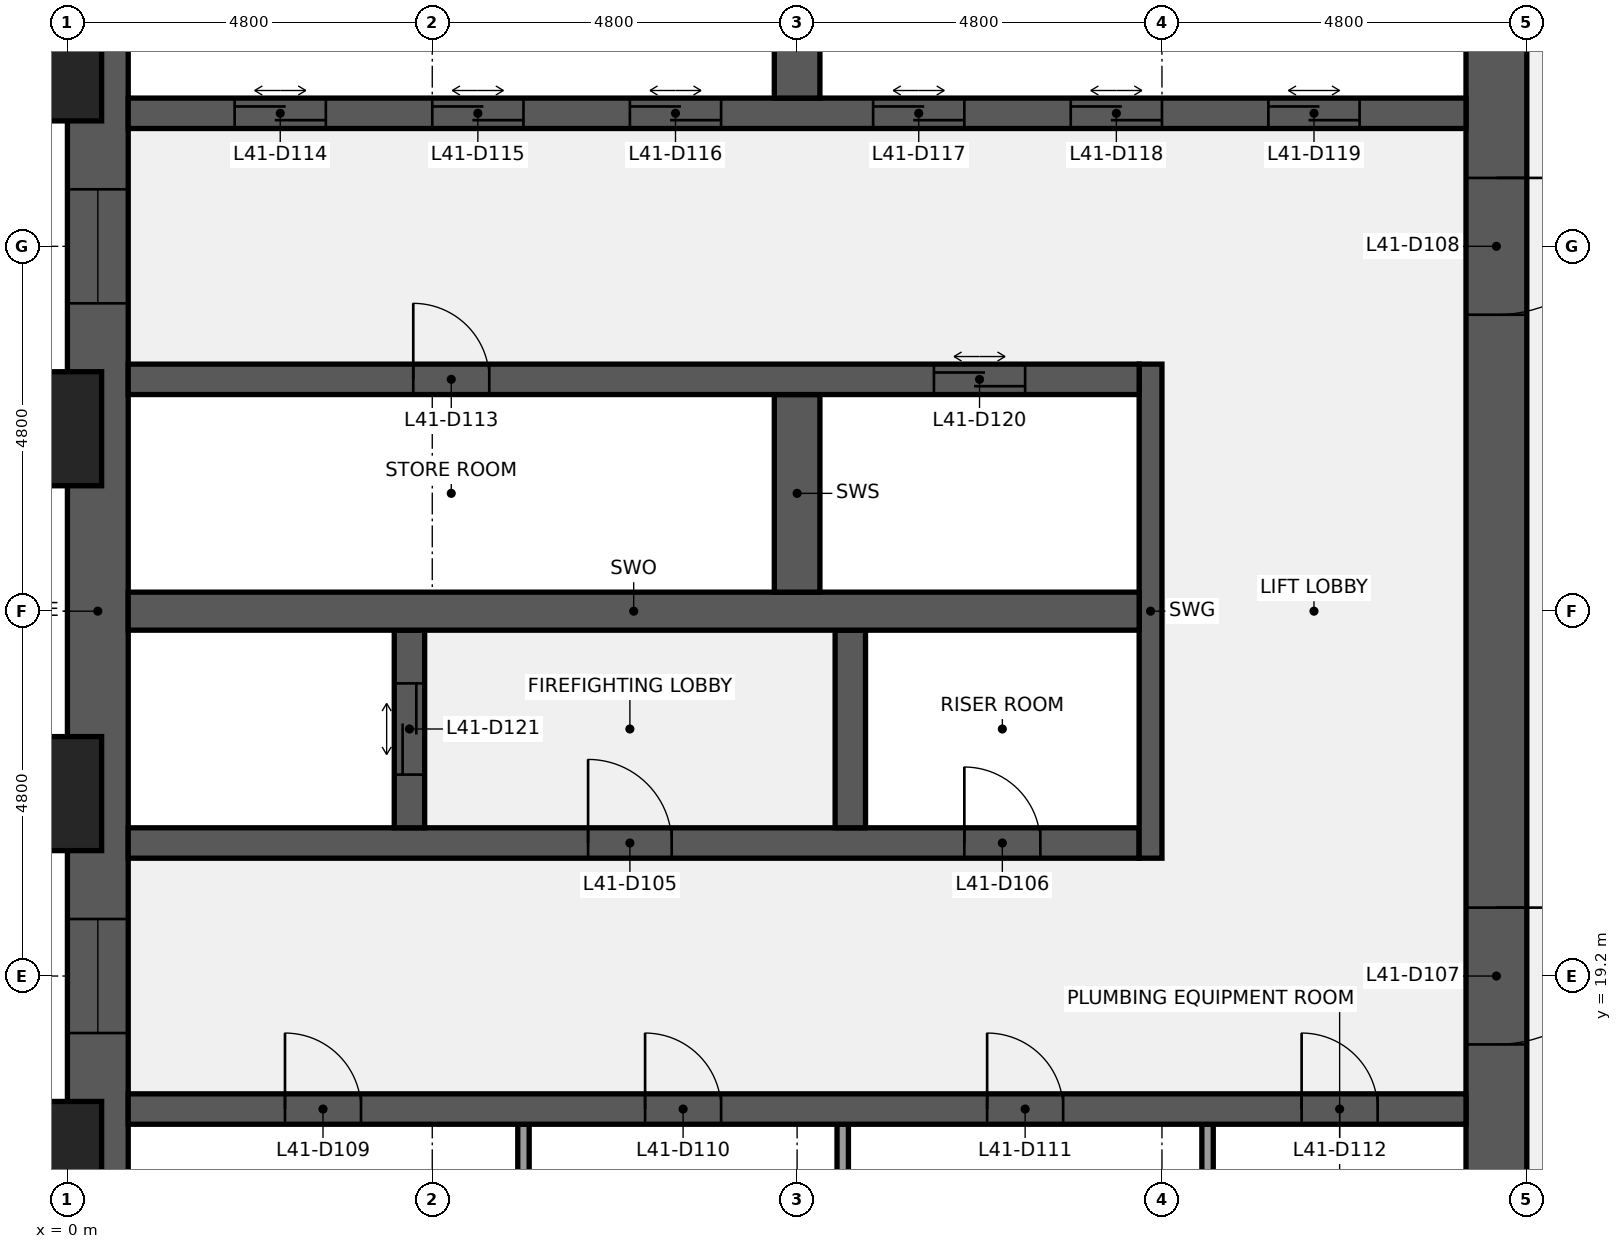
"""IFC4 building model, lengths in metres.
Left out: names, types, materials, properties, quantities, classifications, styles, units other than length and angle.
Written with IfcOpenShell. Run it as: python <this file> out.ifc"""

import sys

from ifc_helpers import new_model, si_unit, direction, frame, frame_2d, origin, origin_2d, place, context, subcontext, project, spatial, rectangle, extrude, element, fill, save


model = new_model("IFC4")
c1 = context("Model", 3, precision=1e-05, world=origin(), true_north=direction((0.0, 1.0)))
c2 = subcontext(c1, "Body", "Model", "MODEL_VIEW")
j1 = project(units=[si_unit("LENGTHUNIT", "METRE"), si_unit("PLANEANGLEUNIT", "RADIAN")], contexts=[c1])
p1 = place(None, origin())
s1 = spatial("IfcSite", under=j1, at=p1, CompositionType="ELEMENT")
p2 = place(p1, origin())
s2 = spatial("IfcBuilding", under=s1, at=p2, CompositionType="ELEMENT")
p3 = place(p2, frame((0.0, 0.0, 193.2)))
s3 = spatial("IfcBuildingStorey", under=s2, at=p3, CompositionType="ELEMENT", Elevation=193.2)
p4 = place(p3, frame((0.4, 9.6, 0.0), z_axis=(0.0, 0.0, 1.0), x_axis=(0.0, 1.0, 0.0)))
e1 = element("IfcWall", 1, at=p4, inside=s3, PredefinedType="SHEAR", context=c2, shape_type="SweptSolid", body=[
    extrude(rectangle(XDim=28.8, YDim=0.8, at=frame_2d((14.4, 0.0))), origin(), (0.0, 0.0, 1.0), 3.84),
])
p5 = place(p4, frame((8.85, 0.0, 0.9)))
e2 = element("IfcOpeningElement", 2, at=p5, cuts=e1, PredefinedType="OPENING", context=c2, shape_type="SweptSolid", body=[
    extrude(rectangle(XDim=1.5, YDim=1.5, at=frame_2d((0.75, 0.75))), frame((0.0, 0.41, 0.0), z_axis=(0.0, -1.0, 0.0), x_axis=(1.0, 0.0, 0.0)), (0.0, 0.0, 1.0), 0.82),
])
p6 = place(p4, frame((18.45, 0.0, 0.9)))
e3 = element("IfcOpeningElement", 3, at=p6, cuts=e1, PredefinedType="OPENING", context=c2, shape_type="SweptSolid", body=[
    extrude(rectangle(XDim=1.5, YDim=1.5, at=frame_2d((0.75, 0.75))), frame((0.0, 0.41, 0.0), z_axis=(0.0, -1.0, 0.0), x_axis=(1.0, 0.0, 0.0)), (0.0, 0.0, 1.0), 0.82),
])
p7 = place(p3, frame((18.8, 38.4, 0.0), z_axis=(0.0, 0.0, 1.0), x_axis=(0.0, -1.0, 0.0)))
e4 = element("IfcWall", 4, at=p7, inside=s3, PredefinedType="SHEAR", context=c2, shape_type="SweptSolid", body=[
    extrude(rectangle(XDim=28.8, YDim=0.8, at=frame_2d((14.4, 0.0))), origin(), (0.0, 0.0, 1.0), 3.84),
])
p8 = place(p7, frame((18.3, 0.0, 0.0)))
e5 = element("IfcOpeningElement", 5, at=p8, cuts=e4, PredefinedType="OPENING", context=c2, shape_type="SweptSolid", body=[
    extrude(rectangle(XDim=1.8, YDim=2.1, at=frame_2d((0.9, 1.05))), frame((0.0, 0.41, 0.0), z_axis=(0.0, -1.0, 0.0), x_axis=(1.0, 0.0, 0.0)), (0.0, 0.0, 1.0), 0.82),
])
p9 = place(p7, frame((8.7, 0.0, 0.0)))
e6 = element("IfcOpeningElement", 6, at=p9, cuts=e4, PredefinedType="OPENING", context=c2, shape_type="SweptSolid", body=[
    extrude(rectangle(XDim=1.8, YDim=2.1, at=frame_2d((0.9, 1.05))), frame((0.0, 0.41, 0.0), z_axis=(0.0, -1.0, 0.0), x_axis=(1.0, 0.0, 0.0)), (0.0, 0.0, 1.0), 0.82),
])
for number, where, z_axis, x_axis in (
    (7, (6.0, 14.65, 0.0), (0.0, 0.0, 1.0), (0.0, 1.0, 0.0)),
    (8, (10.2, 14.65, 0.0), (0.0, 0.0, 1.0), (0.0, 1.0, 0.0)),
    (9, (15.0, 14.65, 0.0), (0.0, 0.0, 1.0), (0.0, 1.0, 0.0)),
):
    element("IfcWall", number, at=place(p3, frame(where, z_axis=z_axis, x_axis=x_axis)), inside=s3, PredefinedType="PARTITIONING", context=c2, shape_type="SweptSolid", body=[
        extrude(rectangle(XDim=2.6, YDim=0.15, at=frame_2d((1.3, 0.0))), origin(), (0.0, 0.0, 1.0), 3.84),
    ])
p10 = place(p3, frame((0.8, 17.45, 0.0), z_axis=(0.0, 0.0, 1.0), x_axis=(1.0, 0.0, 0.0)))
e10 = element("IfcWall", 10, at=p10, inside=s3, PredefinedType="SHEAR", context=c2, shape_type="SweptSolid", body=[
    extrude(rectangle(XDim=17.6, YDim=0.4, at=frame_2d((8.8, 0.0))), origin(), (0.0, 0.0, 1.0), 3.84),
])
p11 = place(p10, frame((2.062, 0.0, 0.0)))
e11 = element("IfcOpeningElement", 11, at=p11, cuts=e10, PredefinedType="OPENING", context=c2, shape_type="SweptSolid", body=[
    extrude(rectangle(XDim=1.0, YDim=2.1, at=frame_2d((0.5, 1.05))), frame((0.0, 0.21, 0.0), z_axis=(0.0, -1.0, 0.0), x_axis=(1.0, 0.0, 0.0)), (0.0, 0.0, 1.0), 0.42),
])
p12 = place(p10, frame((6.8, 0.0, 0.0)))
e12 = element("IfcOpeningElement", 12, at=p12, cuts=e10, PredefinedType="OPENING", context=c2, shape_type="SweptSolid", body=[
    extrude(rectangle(XDim=1.0, YDim=2.1, at=frame_2d((0.5, 1.05))), frame((0.0, 0.21, 0.0), z_axis=(0.0, -1.0, 0.0), x_axis=(1.0, 0.0, 0.0)), (0.0, 0.0, 1.0), 0.42),
])
p13 = place(p10, frame((11.3, 0.0, 0.0)))
e13 = element("IfcOpeningElement", 13, at=p13, cuts=e10, PredefinedType="OPENING", context=c2, shape_type="SweptSolid", body=[
    extrude(rectangle(XDim=1.0, YDim=2.1, at=frame_2d((0.5, 1.05))), frame((0.0, 0.21, 0.0), z_axis=(0.0, -1.0, 0.0), x_axis=(1.0, 0.0, 0.0)), (0.0, 0.0, 1.0), 0.42),
])
p14 = place(p10, frame((15.438, 0.0, 0.0)))
e14 = element("IfcOpeningElement", 14, at=p14, cuts=e10, PredefinedType="OPENING", context=c2, shape_type="SweptSolid", body=[
    extrude(rectangle(XDim=1.0, YDim=2.1, at=frame_2d((0.5, 1.05))), frame((0.0, 0.21, 0.0), z_axis=(0.0, -1.0, 0.0), x_axis=(1.0, 0.0, 0.0)), (0.0, 0.0, 1.0), 0.42),
])
p15 = place(p3, frame((0.8, 20.95, 0.0), z_axis=(0.0, 0.0, 1.0), x_axis=(1.0, 0.0, 0.0)))
e15 = element("IfcWall", 15, at=p15, inside=s3, PredefinedType="SHEAR", context=c2, shape_type="SweptSolid", body=[
    extrude(rectangle(XDim=13.3, YDim=0.4, at=frame_2d((6.65, 0.0))), origin(), (0.0, 0.0, 1.0), 3.84),
])
p16 = place(p15, frame((6.05, 0.0, 0.0)))
e16 = element("IfcOpeningElement", 16, at=p16, cuts=e15, PredefinedType="OPENING", context=c2, shape_type="SweptSolid", body=[
    extrude(rectangle(XDim=1.1, YDim=2.1, at=frame_2d((0.55, 1.05))), frame((0.0, 0.21, 0.0), z_axis=(0.0, -1.0, 0.0), x_axis=(1.0, 0.0, 0.0)), (0.0, 0.0, 1.0), 0.42),
])
p17 = place(p15, frame((11.0, 0.0, 0.0)))
e17 = element("IfcOpeningElement", 17, at=p17, cuts=e15, PredefinedType="OPENING", context=c2, shape_type="SweptSolid", body=[
    extrude(rectangle(XDim=1.0, YDim=2.1, at=frame_2d((0.5, 1.05))), frame((0.0, 0.21, 0.0), z_axis=(0.0, -1.0, 0.0), x_axis=(1.0, 0.0, 0.0)), (0.0, 0.0, 1.0), 0.42),
])
p18 = place(p3, frame((14.25, 20.75, 0.0), z_axis=(0.0, 0.0, 1.0), x_axis=(0.0, 1.0, 0.0)))
e18 = element("IfcWall", 18, at=p18, inside=s3, PredefinedType="SHEAR", context=c2, shape_type="SweptSolid", body=[
    extrude(rectangle(XDim=6.5, YDim=0.3, at=frame_2d((3.25, 0.0))), origin(), (0.0, 0.0, 1.0), 3.84),
])
p19 = place(p3, frame((4.5, 21.15, 0.0), z_axis=(0.0, 0.0, 1.0), x_axis=(0.0, 1.0, 0.0)))
e19 = element("IfcWall", 19, at=p19, inside=s3, PredefinedType="SHEAR", context=c2, shape_type="SweptSolid", body=[
    extrude(rectangle(XDim=2.6, YDim=0.4, at=frame_2d((1.3, 0.0))), origin(), (0.0, 0.0, 1.0), 3.84),
])
p20 = place(p19, frame((0.7, 0.0, 0.0)))
e20 = element("IfcOpeningElement", 20, at=p20, cuts=e19, PredefinedType="OPENING", context=c2, shape_type="SweptSolid", body=[
    extrude(rectangle(XDim=1.2, YDim=2.1, at=frame_2d((0.6, 1.05))), frame((0.0, 0.21, 0.0), z_axis=(0.0, -1.0, 0.0), x_axis=(1.0, 0.0, 0.0)), (0.0, 0.0, 1.0), 0.42),
])
p21 = place(p3, frame((10.3, 21.15, 0.0), z_axis=(0.0, 0.0, 1.0), x_axis=(0.0, 1.0, 0.0)))
e21 = element("IfcWall", 21, at=p21, inside=s3, PredefinedType="SHEAR", context=c2, shape_type="SweptSolid", body=[
    extrude(rectangle(XDim=2.6, YDim=0.4, at=frame_2d((1.3, 0.0))), origin(), (0.0, 0.0, 1.0), 3.84),
])
p22 = place(p3, frame((0.8, 24.0, 0.0), z_axis=(0.0, 0.0, 1.0), x_axis=(1.0, 0.0, 0.0)))
e22 = element("IfcWall", 22, at=p22, inside=s3, PredefinedType="SHEAR", context=c2, shape_type="SweptSolid", body=[
    extrude(rectangle(XDim=13.3, YDim=0.5, at=frame_2d((6.65, 0.0))), origin(), (0.0, 0.0, 1.0), 3.84),
])
p23 = place(p3, frame((9.6, 24.25, 0.0), z_axis=(0.0, 0.0, 1.0), x_axis=(0.0, 1.0, 0.0)))
e23 = element("IfcWall", 23, at=p23, inside=s3, PredefinedType="SHEAR", context=c2, shape_type="SweptSolid", body=[
    extrude(rectangle(XDim=2.6, YDim=0.6, at=frame_2d((1.3, 0.0))), origin(), (0.0, 0.0, 1.0), 3.84),
])
p24 = place(p3, frame((0.8, 27.05, 0.0), z_axis=(0.0, 0.0, 1.0), x_axis=(1.0, 0.0, 0.0)))
e24 = element("IfcWall", 24, at=p24, inside=s3, PredefinedType="SHEAR", context=c2, shape_type="SweptSolid", body=[
    extrude(rectangle(XDim=13.3, YDim=0.4, at=frame_2d((6.65, 0.0))), origin(), (0.0, 0.0, 1.0), 3.84),
])
p25 = place(p24, frame((3.75, 0.0, 0.0)))
e25 = element("IfcOpeningElement", 25, at=p25, cuts=e24, PredefinedType="OPENING", context=c2, shape_type="SweptSolid", body=[
    extrude(rectangle(XDim=1.0, YDim=2.1, at=frame_2d((0.5, 1.05))), frame((0.0, 0.21, 0.0), z_axis=(0.0, -1.0, 0.0), x_axis=(1.0, 0.0, 0.0)), (0.0, 0.0, 1.0), 0.42),
])
p26 = place(p24, frame((10.6, 0.0, 0.0)))
e26 = element("IfcOpeningElement", 26, at=p26, cuts=e24, PredefinedType="OPENING", context=c2, shape_type="SweptSolid", body=[
    extrude(rectangle(XDim=1.2, YDim=2.1, at=frame_2d((0.6, 1.05))), frame((0.0, 0.21, 0.0), z_axis=(0.0, -1.0, 0.0), x_axis=(1.0, 0.0, 0.0)), (0.0, 0.0, 1.0), 0.42),
])
p27 = place(p3, frame((0.8, 30.55, 0.0), z_axis=(0.0, 0.0, 1.0), x_axis=(1.0, 0.0, 0.0)))
e27 = element("IfcWall", 27, at=p27, inside=s3, PredefinedType="SHEAR", context=c2, shape_type="SweptSolid", body=[
    extrude(rectangle(XDim=17.6, YDim=0.4, at=frame_2d((8.8, 0.0))), origin(), (0.0, 0.0, 1.0), 3.84),
])
p28 = place(p27, frame((1.4, 0.0, 0.0)))
e28 = element("IfcOpeningElement", 28, at=p28, cuts=e27, PredefinedType="OPENING", context=c2, shape_type="SweptSolid", body=[
    extrude(rectangle(XDim=1.2, YDim=2.1, at=frame_2d((0.6, 1.05))), frame((0.0, 0.21, 0.0), z_axis=(0.0, -1.0, 0.0), x_axis=(1.0, 0.0, 0.0)), (0.0, 0.0, 1.0), 0.42),
])
p29 = place(p27, frame((4.0, 0.0, 0.0)))
e29 = element("IfcOpeningElement", 29, at=p29, cuts=e27, PredefinedType="OPENING", context=c2, shape_type="SweptSolid", body=[
    extrude(rectangle(XDim=1.2, YDim=2.1, at=frame_2d((0.6, 1.05))), frame((0.0, 0.21, 0.0), z_axis=(0.0, -1.0, 0.0), x_axis=(1.0, 0.0, 0.0)), (0.0, 0.0, 1.0), 0.42),
])
p30 = place(p27, frame((6.6, 0.0, 0.0)))
e30 = element("IfcOpeningElement", 30, at=p30, cuts=e27, PredefinedType="OPENING", context=c2, shape_type="SweptSolid", body=[
    extrude(rectangle(XDim=1.2, YDim=2.1, at=frame_2d((0.6, 1.05))), frame((0.0, 0.21, 0.0), z_axis=(0.0, -1.0, 0.0), x_axis=(1.0, 0.0, 0.0)), (0.0, 0.0, 1.0), 0.42),
])
p31 = place(p27, frame((9.8, 0.0, 0.0)))
e31 = element("IfcOpeningElement", 31, at=p31, cuts=e27, PredefinedType="OPENING", context=c2, shape_type="SweptSolid", body=[
    extrude(rectangle(XDim=1.2, YDim=2.1, at=frame_2d((0.6, 1.05))), frame((0.0, 0.21, 0.0), z_axis=(0.0, -1.0, 0.0), x_axis=(1.0, 0.0, 0.0)), (0.0, 0.0, 1.0), 0.42),
])
p32 = place(p27, frame((12.4, 0.0, 0.0)))
e32 = element("IfcOpeningElement", 32, at=p32, cuts=e27, PredefinedType="OPENING", context=c2, shape_type="SweptSolid", body=[
    extrude(rectangle(XDim=1.2, YDim=2.1, at=frame_2d((0.6, 1.05))), frame((0.0, 0.21, 0.0), z_axis=(0.0, -1.0, 0.0), x_axis=(1.0, 0.0, 0.0)), (0.0, 0.0, 1.0), 0.42),
])
p33 = place(p27, frame((15.0, 0.0, 0.0)))
e33 = element("IfcOpeningElement", 33, at=p33, cuts=e27, PredefinedType="OPENING", context=c2, shape_type="SweptSolid", body=[
    extrude(rectangle(XDim=1.2, YDim=2.1, at=frame_2d((0.6, 1.05))), frame((0.0, 0.21, 0.0), z_axis=(0.0, -1.0, 0.0), x_axis=(1.0, 0.0, 0.0)), (0.0, 0.0, 1.0), 0.42),
])
p34 = place(p3, frame((9.6, 30.75, 0.0), z_axis=(0.0, 0.0, 1.0), x_axis=(0.0, 1.0, 0.0)))
e34 = element("IfcWall", 34, at=p34, inside=s3, PredefinedType="SHEAR", context=c2, shape_type="SweptSolid", body=[
    extrude(rectangle(XDim=2.6, YDim=0.6, at=frame_2d((1.3, 0.0))), origin(), (0.0, 0.0, 1.0), 3.84),
])
for number, where, z_axis, x_axis in (
    (35, (-0.75, 16.8, 0.0), (0.0, 0.0, 1.0), (0.0, 1.0, 0.0)),
    (36, (-0.75, 21.6, 0.0), (0.0, 0.0, 1.0), (0.0, 1.0, 0.0)),
    (37, (-0.75, 26.4, 0.0), (0.0, 0.0, 1.0), (0.0, 1.0, 0.0)),
    (38, (-0.75, 31.2, 0.0), (0.0, 0.0, 1.0), (0.0, 1.0, 0.0)),
):
    element("IfcColumn", number, at=place(p3, frame(where, z_axis=z_axis, x_axis=x_axis)), inside=s3, PredefinedType="PILASTER", context=c2, shape_type="SweptSolid", body=[
        extrude(rectangle(XDim=2.4, YDim=1.5, at=origin_2d()), origin(), (0.0, 0.0, 1.0), 4.0),
    ])
p35 = place(p16, origin())
e39 = element("IfcDoor", 39, at=p35, inside=s3, OperationType="SINGLE_SWING_LEFT", PredefinedType="DOOR", context=c2, shape_type="SweptSolid", body=[
    extrude(rectangle(XDim=1.1, YDim=2.1, at=frame_2d((0.55, 1.05))), frame((0.0, 0.025, 0.0), z_axis=(0.0, -1.0, 0.0), x_axis=(1.0, 0.0, 0.0)), (0.0, 0.0, 1.0), 0.05),
])
fill(e16, e39)
p36 = place(p17, origin())
e40 = element("IfcDoor", 40, at=p36, inside=s3, OperationType="SINGLE_SWING_LEFT", PredefinedType="DOOR", context=c2, shape_type="SweptSolid", body=[
    extrude(rectangle(XDim=1.0, YDim=2.1, at=frame_2d((0.5, 1.05))), frame((0.0, 0.025, 0.0), z_axis=(0.0, -1.0, 0.0), x_axis=(1.0, 0.0, 0.0)), (0.0, 0.0, 1.0), 0.05),
])
fill(e17, e40)
p37 = place(p8, origin())
e41 = element("IfcDoor", 41, at=p37, inside=s3, OperationType="DOUBLE_DOOR_SINGLE_SWING", PredefinedType="DOOR", context=c2, shape_type="SweptSolid", body=[
    extrude(rectangle(XDim=1.8, YDim=2.1, at=frame_2d((0.9, 1.05))), frame((0.0, 0.025, 0.0), z_axis=(0.0, -1.0, 0.0), x_axis=(1.0, 0.0, 0.0)), (0.0, 0.0, 1.0), 0.05),
])
fill(e5, e41)
p38 = place(p9, origin())
e42 = element("IfcDoor", 42, at=p38, inside=s3, OperationType="DOUBLE_DOOR_SINGLE_SWING", PredefinedType="DOOR", context=c2, shape_type="SweptSolid", body=[
    extrude(rectangle(XDim=1.8, YDim=2.1, at=frame_2d((0.9, 1.05))), frame((0.0, 0.025, 0.0), z_axis=(0.0, -1.0, 0.0), x_axis=(1.0, 0.0, 0.0)), (0.0, 0.0, 1.0), 0.05),
])
fill(e6, e42)
p39 = place(p11, origin())
e43 = element("IfcDoor", 43, at=p39, inside=s3, OperationType="SINGLE_SWING_LEFT", PredefinedType="DOOR", context=c2, shape_type="SweptSolid", body=[
    extrude(rectangle(XDim=1.0, YDim=2.1, at=frame_2d((0.5, 1.05))), frame((0.0, 0.025, 0.0), z_axis=(0.0, -1.0, 0.0), x_axis=(1.0, 0.0, 0.0)), (0.0, 0.0, 1.0), 0.05),
])
fill(e11, e43)
p40 = place(p12, origin())
e44 = element("IfcDoor", 44, at=p40, inside=s3, OperationType="SINGLE_SWING_LEFT", PredefinedType="DOOR", context=c2, shape_type="SweptSolid", body=[
    extrude(rectangle(XDim=1.0, YDim=2.1, at=frame_2d((0.5, 1.05))), frame((0.0, 0.025, 0.0), z_axis=(0.0, -1.0, 0.0), x_axis=(1.0, 0.0, 0.0)), (0.0, 0.0, 1.0), 0.05),
])
fill(e12, e44)
p41 = place(p13, origin())
e45 = element("IfcDoor", 45, at=p41, inside=s3, OperationType="SINGLE_SWING_LEFT", PredefinedType="DOOR", context=c2, shape_type="SweptSolid", body=[
    extrude(rectangle(XDim=1.0, YDim=2.1, at=frame_2d((0.5, 1.05))), frame((0.0, 0.025, 0.0), z_axis=(0.0, -1.0, 0.0), x_axis=(1.0, 0.0, 0.0)), (0.0, 0.0, 1.0), 0.05),
])
fill(e13, e45)
p42 = place(p14, origin())
e46 = element("IfcDoor", 46, at=p42, inside=s3, OperationType="SINGLE_SWING_LEFT", PredefinedType="DOOR", context=c2, shape_type="SweptSolid", body=[
    extrude(rectangle(XDim=1.0, YDim=2.1, at=frame_2d((0.5, 1.05))), frame((0.0, 0.025, 0.0), z_axis=(0.0, -1.0, 0.0), x_axis=(1.0, 0.0, 0.0)), (0.0, 0.0, 1.0), 0.05),
])
fill(e14, e46)
p43 = place(p25, origin())
e47 = element("IfcDoor", 47, at=p43, inside=s3, OperationType="SINGLE_SWING_LEFT", PredefinedType="DOOR", context=c2, shape_type="SweptSolid", body=[
    extrude(rectangle(XDim=1.0, YDim=2.1, at=frame_2d((0.5, 1.05))), frame((0.0, 0.025, 0.0), z_axis=(0.0, -1.0, 0.0), x_axis=(1.0, 0.0, 0.0)), (0.0, 0.0, 1.0), 0.05),
])
fill(e25, e47)
p44 = place(p28, origin())
e48 = element("IfcDoor", 48, at=p44, inside=s3, OperationType="DOUBLE_DOOR_SLIDING", PredefinedType="DOOR", context=c2, shape_type="SweptSolid", body=[
    extrude(rectangle(XDim=1.2, YDim=2.1, at=frame_2d((0.6, 1.05))), frame((0.0, 0.025, 0.0), z_axis=(0.0, -1.0, 0.0), x_axis=(1.0, 0.0, 0.0)), (0.0, 0.0, 1.0), 0.05),
])
fill(e28, e48)
p45 = place(p29, origin())
e49 = element("IfcDoor", 49, at=p45, inside=s3, OperationType="DOUBLE_DOOR_SLIDING", PredefinedType="DOOR", context=c2, shape_type="SweptSolid", body=[
    extrude(rectangle(XDim=1.2, YDim=2.1, at=frame_2d((0.6, 1.05))), frame((0.0, 0.025, 0.0), z_axis=(0.0, -1.0, 0.0), x_axis=(1.0, 0.0, 0.0)), (0.0, 0.0, 1.0), 0.05),
])
fill(e29, e49)
p46 = place(p30, origin())
e50 = element("IfcDoor", 50, at=p46, inside=s3, OperationType="DOUBLE_DOOR_SLIDING", PredefinedType="DOOR", context=c2, shape_type="SweptSolid", body=[
    extrude(rectangle(XDim=1.2, YDim=2.1, at=frame_2d((0.6, 1.05))), frame((0.0, 0.025, 0.0), z_axis=(0.0, -1.0, 0.0), x_axis=(1.0, 0.0, 0.0)), (0.0, 0.0, 1.0), 0.05),
])
fill(e30, e50)
p47 = place(p31, origin())
e51 = element("IfcDoor", 51, at=p47, inside=s3, OperationType="DOUBLE_DOOR_SLIDING", PredefinedType="DOOR", context=c2, shape_type="SweptSolid", body=[
    extrude(rectangle(XDim=1.2, YDim=2.1, at=frame_2d((0.6, 1.05))), frame((0.0, 0.025, 0.0), z_axis=(0.0, -1.0, 0.0), x_axis=(1.0, 0.0, 0.0)), (0.0, 0.0, 1.0), 0.05),
])
fill(e31, e51)
p48 = place(p32, origin())
e52 = element("IfcDoor", 52, at=p48, inside=s3, OperationType="DOUBLE_DOOR_SLIDING", PredefinedType="DOOR", context=c2, shape_type="SweptSolid", body=[
    extrude(rectangle(XDim=1.2, YDim=2.1, at=frame_2d((0.6, 1.05))), frame((0.0, 0.025, 0.0), z_axis=(0.0, -1.0, 0.0), x_axis=(1.0, 0.0, 0.0)), (0.0, 0.0, 1.0), 0.05),
])
fill(e32, e52)
p49 = place(p33, origin())
e53 = element("IfcDoor", 53, at=p49, inside=s3, OperationType="DOUBLE_DOOR_SLIDING", PredefinedType="DOOR", context=c2, shape_type="SweptSolid", body=[
    extrude(rectangle(XDim=1.2, YDim=2.1, at=frame_2d((0.6, 1.05))), frame((0.0, 0.025, 0.0), z_axis=(0.0, -1.0, 0.0), x_axis=(1.0, 0.0, 0.0)), (0.0, 0.0, 1.0), 0.05),
])
fill(e33, e53)
p50 = place(p26, origin())
e54 = element("IfcDoor", 54, at=p50, inside=s3, OperationType="DOUBLE_DOOR_SLIDING", PredefinedType="DOOR", context=c2, shape_type="SweptSolid", body=[
    extrude(rectangle(XDim=1.2, YDim=2.1, at=frame_2d((0.6, 1.05))), frame((0.0, 0.025, 0.0), z_axis=(0.0, -1.0, 0.0), x_axis=(1.0, 0.0, 0.0)), (0.0, 0.0, 1.0), 0.05),
])
fill(e26, e54)
p51 = place(p20, origin())
e55 = element("IfcDoor", 55, at=p51, inside=s3, OperationType="DOUBLE_DOOR_SLIDING", PredefinedType="DOOR", context=c2, shape_type="SweptSolid", body=[
    extrude(rectangle(XDim=1.2, YDim=2.1, at=frame_2d((0.6, 1.05))), frame((0.0, 0.025, 0.0), z_axis=(0.0, -1.0, 0.0), x_axis=(1.0, 0.0, 0.0)), (0.0, 0.0, 1.0), 0.05),
])
fill(e20, e55)
p52 = place(p5, origin())
e56 = element("IfcWindow", 56, at=p52, inside=s3, PartitioningType="SINGLE_PANEL", PredefinedType="WINDOW", context=c2, shape_type="SweptSolid", body=[
    extrude(rectangle(XDim=1.5, YDim=1.5, at=frame_2d((0.75, 0.75))), frame((0.0, 0.03, 0.0), z_axis=(0.0, -1.0, 0.0), x_axis=(1.0, 0.0, 0.0)), (0.0, 0.0, 1.0), 0.06),
])
fill(e2, e56)
p53 = place(p6, origin())
e57 = element("IfcWindow", 57, at=p53, inside=s3, PartitioningType="SINGLE_PANEL", PredefinedType="WINDOW", context=c2, shape_type="SweptSolid", body=[
    extrude(rectangle(XDim=1.5, YDim=1.5, at=frame_2d((0.75, 0.75))), frame((0.0, 0.03, 0.0), z_axis=(0.0, -1.0, 0.0), x_axis=(1.0, 0.0, 0.0)), (0.0, 0.0, 1.0), 0.06),
])
fill(e3, e57)
save(model, sys.argv[1])
